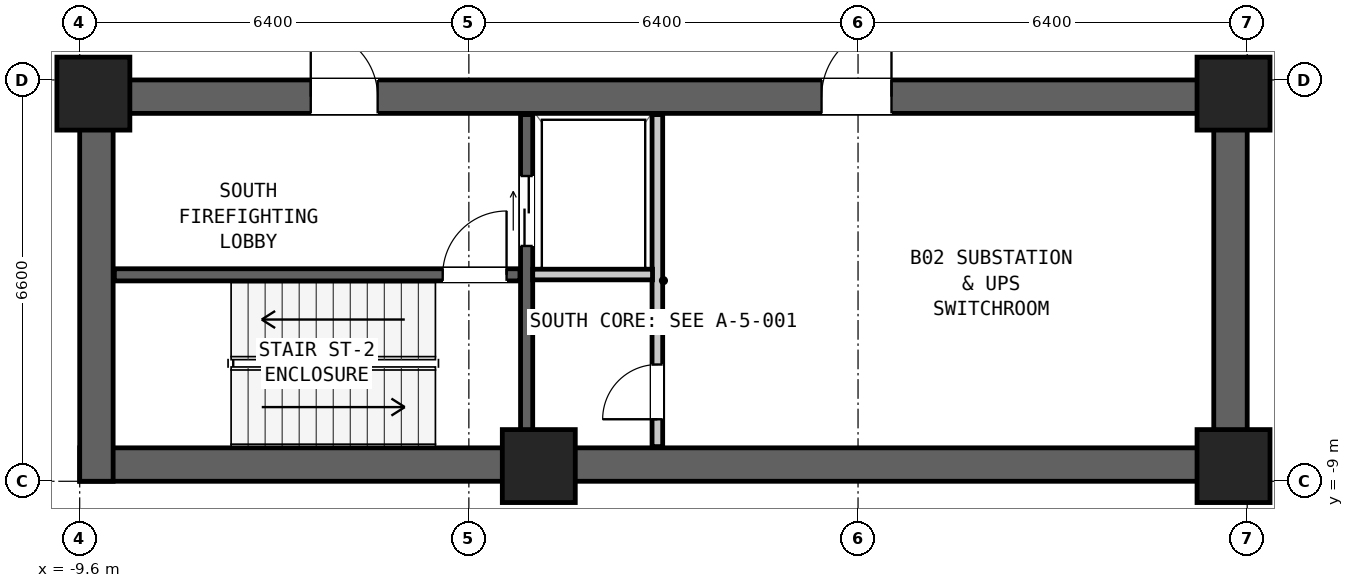
"""IFC4 building model, lengths in metres.
Left out: names, types, materials, properties, quantities, classifications, styles, units other than length and angle.
Written with IfcOpenShell. Run it as: python <this file> out.ifc"""

import sys

from ifc_helpers import new_model, si_unit, direction, frame, frame_2d, origin, origin_2d, place, context, subcontext, project, spatial, rectangle, extrude, element, fill, save


model = new_model("IFC4")
c1 = context("Model", 3, precision=1e-05, world=origin(), true_north=direction((0.0, 1.0)))
c2 = subcontext(c1, "Body", "Model", "MODEL_VIEW")
j1 = project(units=[si_unit("LENGTHUNIT", "METRE"), si_unit("PLANEANGLEUNIT", "RADIAN")], contexts=[c1])
p1 = place(None, origin())
s1 = spatial("IfcSite", under=j1, at=p1, CompositionType="ELEMENT")
p2 = place(p1, origin())
s2 = spatial("IfcBuilding", under=s1, at=p2, CompositionType="ELEMENT")
p3 = place(p2, frame((0.0, 0.0, -9.0)))
s3 = spatial("IfcBuildingStorey", under=s2, at=p3, CompositionType="ELEMENT", Elevation=-9.0)
p4 = place(p3, frame((-9.6, -8.725, 0.0), z_axis=(0.0, 0.0, 1.0), x_axis=(1.0, 0.0, 0.0)))
e1 = element("IfcWall", 1, at=p4, inside=s3, PredefinedType="SHEAR", context=c2, shape_type="SweptSolid", body=[
    extrude(rectangle(XDim=19.2, YDim=0.55, at=frame_2d((9.6, 0.0))), origin(), (0.0, 0.0, 1.0), 4.5),
])
p5 = place(p3, frame((-9.6, -2.675, 0.0), z_axis=(0.0, 0.0, 1.0), x_axis=(1.0, 0.0, 0.0)))
e2 = element("IfcWall", 2, at=p5, inside=s3, PredefinedType="SHEAR", context=c2, shape_type="SweptSolid", body=[
    extrude(rectangle(XDim=19.2, YDim=0.55, at=frame_2d((9.6, 0.0))), origin(), (0.0, 0.0, 1.0), 4.5),
])
p6 = place(p5, frame((3.8, 0.0, 0.0)))
e3 = element("IfcOpeningElement", 3, at=p6, cuts=e2, PredefinedType="OPENING", context=c2, shape_type="SweptSolid", body=[
    extrude(rectangle(XDim=1.1, YDim=2.08, at=frame_2d((0.55, 1.04))), frame((0.0, 0.287, 0.0), z_axis=(0.0, -1.0, 0.0), x_axis=(1.0, 0.0, 0.0)), (0.0, 0.0, 1.0), 0.574),
])
p7 = place(p5, frame((12.2, 0.0, 0.0)))
e4 = element("IfcOpeningElement", 4, at=p7, cuts=e2, PredefinedType="OPENING", context=c2, shape_type="SweptSolid", body=[
    extrude(rectangle(XDim=1.15, YDim=2.1, at=frame_2d((0.575, 1.05))), frame((0.0, 0.287, 0.0), z_axis=(0.0, -1.0, 0.0), x_axis=(1.0, 0.0, 0.0)), (0.0, 0.0, 1.0), 0.574),
])
for number, where, z_axis, x_axis in (
    (5, (-9.325, -9.0, 0.0), (0.0, 0.0, 1.0), (0.0, 1.0, 0.0)),
    (6, (9.325, -9.0, 0.0), (0.0, 0.0, 1.0), (0.0, 1.0, 0.0)),
):
    element("IfcWall", number, at=place(p3, frame(where, z_axis=z_axis, x_axis=x_axis)), inside=s3, PredefinedType="SHEAR", context=c2, shape_type="SweptSolid", body=[
        extrude(rectangle(XDim=6.6, YDim=0.55, at=frame_2d((3.3, 0.0))), origin(), (0.0, 0.0, 1.0), 4.5),
    ])
for number, where, z_axis, x_axis in (
    (7, (-9.375, -2.625, 0.0), (0.0, 0.0, 1.0), (1.0, 0.0, 0.0)),
    (8, (9.375, -2.625, 0.0), (0.0, 0.0, 1.0), (1.0, 0.0, 0.0)),
    (9, (-2.05, -8.75, 0.0), (0.0, 0.0, 1.0), (1.0, 0.0, 0.0)),
    (10, (9.375, -8.75, 0.0), (0.0, 0.0, 1.0), (1.0, 0.0, 0.0)),
):
    element("IfcColumn", number, at=place(p3, frame(where, z_axis=z_axis, x_axis=x_axis)), inside=s3, PredefinedType="COLUMN", context=c2, shape_type="SweptSolid", body=[
        extrude(rectangle(XDim=1.2, YDim=1.2, at=origin_2d()), origin(), (0.0, 0.0, 1.0), 4.5),
    ])
p8 = place(p3, frame((-9.03, -5.605, 0.0), z_axis=(0.0, 0.0, 1.0), x_axis=(1.0, 0.0, 0.0)))
e11 = element("IfcWall", 11, at=p8, inside=s3, PredefinedType="SHEAR", context=c2, shape_type="SweptSolid", body=[
    extrude(rectangle(XDim=6.67, YDim=0.2, at=frame_2d((3.335, 0.0))), origin(), (0.0, 0.0, 1.0), 4.18),
])
p9 = place(p8, frame((5.4, 0.0, 0.0)))
e12 = element("IfcOpeningElement", 12, at=p9, cuts=e11, PredefinedType="OPENING", context=c2, shape_type="SweptSolid", body=[
    extrude(rectangle(XDim=1.05, YDim=2.08, at=frame_2d((0.525, 1.04))), frame((0.0, 0.112, 0.0), z_axis=(0.0, -1.0, 0.0), x_axis=(1.0, 0.0, 0.0)), (0.0, 0.0, 1.0), 0.224),
])
p10 = place(p3, frame((-2.25, -8.43, 0.0), z_axis=(0.0, 0.0, 1.0), x_axis=(0.0, 1.0, 0.0)))
e13 = element("IfcWall", 13, at=p10, inside=s3, PredefinedType="SHEAR", context=c2, shape_type="SweptSolid", body=[
    extrude(rectangle(XDim=5.46, YDim=0.2, at=frame_2d((2.73, 0.0))), origin(), (0.0, 0.0, 1.0), 4.18),
])
p11 = place(p10, frame((3.3, 0.0, 0.0)))
e14 = element("IfcOpeningElement", 14, at=p11, cuts=e13, PredefinedType="OPENING", context=c2, shape_type="SweptSolid", body=[
    extrude(rectangle(XDim=1.15, YDim=2.08, at=frame_2d((0.575, 1.04))), frame((0.0, 0.112, 0.0), z_axis=(0.0, -1.0, 0.0), x_axis=(1.0, 0.0, 0.0)), (0.0, 0.0, 1.0), 0.224),
])
p12 = place(p3, frame((-0.1, -8.43, 0.0), z_axis=(0.0, 0.0, 1.0), x_axis=(0.0, 1.0, 0.0)))
e15 = element("IfcWall", 15, at=p12, inside=s3, PredefinedType="PARTITIONING", context=c2, shape_type="SweptSolid", body=[
    extrude(rectangle(XDim=5.46, YDim=0.175, at=frame_2d((2.73, 0.0))), origin(), (0.0, 0.0, 1.0), 4.18),
])
p13 = place(p12, frame((0.45, 0.0, 0.0)))
e16 = element("IfcOpeningElement", 16, at=p13, cuts=e15, PredefinedType="OPENING", context=c2, shape_type="SweptSolid", body=[
    extrude(rectangle(XDim=0.9, YDim=2.05, at=frame_2d((0.45, 1.025))), frame((0.0, 0.1, 0.0), z_axis=(0.0, -1.0, 0.0), x_axis=(1.0, 0.0, 0.0)), (0.0, 0.0, 1.0), 0.199),
])
p14 = place(p3, frame((-2.15, -5.6, 0.0), z_axis=(0.0, 0.0, 1.0), x_axis=(1.0, 0.0, 0.0)))
e17 = element("IfcWall", 17, at=p14, inside=s3, PredefinedType="PARTITIONING", context=c2, shape_type="SweptSolid", body=[
    extrude(rectangle(XDim=1.97, YDim=0.175, at=frame_2d((0.985, 0.0))), origin(), (0.0, 0.0, 1.0), 4.18),
])
p15 = place(p9, origin())
e18 = element("IfcDoor", 18, at=p15, inside=s3, OperationType="SINGLE_SWING_RIGHT", PredefinedType="DOOR", context=c2, shape_type="SweptSolid", body=[
    extrude(rectangle(XDim=1.05, YDim=2.08, at=frame_2d((0.525, 1.04))), frame((0.0, 0.025, 0.0), z_axis=(0.0, -1.0, 0.0), x_axis=(1.0, 0.0, 0.0)), (0.0, 0.0, 1.0), 0.05),
])
fill(e12, e18)
p16 = place(p6, origin())
e19 = element("IfcDoor", 19, at=p16, inside=s3, OperationType="SINGLE_SWING_LEFT", PredefinedType="DOOR", context=c2, shape_type="SweptSolid", body=[
    extrude(rectangle(XDim=1.1, YDim=2.08, at=frame_2d((0.55, 1.04))), frame((0.0, 0.025, 0.0), z_axis=(0.0, -1.0, 0.0), x_axis=(1.0, 0.0, 0.0)), (0.0, 0.0, 1.0), 0.05),
])
fill(e3, e19)
p17 = place(p11, origin())
e20 = element("IfcDoor", 20, at=p17, inside=s3, OperationType="DOUBLE_DOOR_SLIDING", PredefinedType="DOOR", context=c2, shape_type="SweptSolid", body=[
    extrude(rectangle(XDim=1.15, YDim=2.08, at=frame_2d((0.575, 1.04))), frame((0.0, 0.025, 0.0), z_axis=(0.0, -1.0, 0.0), x_axis=(1.0, 0.0, 0.0)), (0.0, 0.0, 1.0), 0.05),
])
fill(e14, e20)
p18 = place(p13, origin())
e21 = element("IfcDoor", 21, at=p18, inside=s3, OperationType="SINGLE_SWING_LEFT", PredefinedType="DOOR", context=c2, shape_type="SweptSolid", body=[
    extrude(rectangle(XDim=0.9, YDim=2.05, at=frame_2d((0.45, 1.025))), frame((0.0, 0.025, 0.0), z_axis=(0.0, -1.0, 0.0), x_axis=(1.0, 0.0, 0.0)), (0.0, 0.0, 1.0), 0.05),
])
fill(e16, e21)
p19 = place(p7, origin())
e22 = element("IfcDoor", 22, at=p19, inside=s3, OperationType="SINGLE_SWING_RIGHT", PredefinedType="DOOR", context=c2, shape_type="SweptSolid", body=[
    extrude(rectangle(XDim=1.15, YDim=2.1, at=frame_2d((0.575, 1.05))), frame((0.0, 0.025, 0.0), z_axis=(0.0, -1.0, 0.0), x_axis=(1.0, 0.0, 0.0)), (0.0, 0.0, 1.0), 0.05),
])
fill(e4, e22)
save(model, sys.argv[1])
